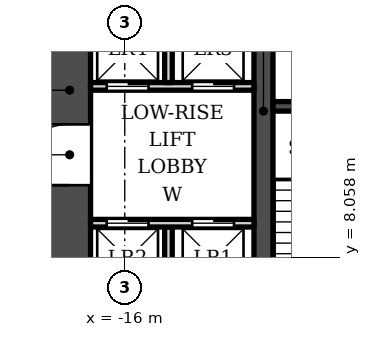
"""IFC4 building model, lengths in metres.
Left out: names, types, materials, properties, quantities, classifications, styles, units other than length and angle.
Written with IfcOpenShell. Run it as: python <this file> out.ifc"""

import sys

from ifc_helpers import new_model, si_unit, direction, frame, frame_2d, origin, place, context, subcontext, project, spatial, rectangle, extrude, element, fill, save


model = new_model("IFC4")
c1 = context("Model", 3, precision=1e-05, world=origin(), true_north=direction((0.0, 1.0)))
c2 = subcontext(c1, "Body", "Model", "MODEL_VIEW")
j1 = project(units=[si_unit("LENGTHUNIT", "METRE"), si_unit("PLANEANGLEUNIT", "RADIAN")], contexts=[c1])
p1 = place(None, origin())
s1 = spatial("IfcSite", under=j1, at=p1, CompositionType="ELEMENT")
p2 = place(p1, origin())
s2 = spatial("IfcBuilding", under=s1, at=p2, CompositionType="ELEMENT")
p3 = place(p2, frame((0.0, 0.0, 20.0)))
s3 = spatial("IfcBuildingStorey", under=s2, at=p3, CompositionType="ELEMENT", Elevation=20.0)
p4 = place(p3, frame((-12.35, 5.253, 0.0), z_axis=(0.0, 0.0, 1.0), x_axis=(0.0, 1.0, 0.0)))
e1 = element("IfcWall", 1, at=p4, inside=s3, PredefinedType="SHEAR", context=c2, shape_type="SweptSolid", body=[
    extrude(rectangle(XDim=13.3, YDim=0.5, at=frame_2d((6.65, 0.0))), origin(), (0.0, 0.0, 1.0), 9.0),
])
p5 = place(p3, frame((-12.1, 12.028, 0.0), z_axis=(0.0, 0.0, 1.0), x_axis=(1.0, 0.0, 0.0)))
e2 = element("IfcWall", 2, at=p5, inside=s3, PredefinedType="SHEAR", context=c2, shape_type="SweptSolid", body=[
    extrude(rectangle(XDim=3.75, YDim=0.25, at=frame_2d((1.875, 0.0))), origin(), (0.0, 0.0, 1.0), 9.0),
])
p6 = place(p3, frame((-17.45, 5.853, 0.0), z_axis=(0.0, 0.0, 1.0), x_axis=(0.0, 1.0, 0.0)))
e3 = element("IfcWall", 3, at=p6, inside=s3, PredefinedType="SHEAR", context=c2, shape_type="SweptSolid", body=[
    extrude(rectangle(XDim=13.2, YDim=1.1, at=frame_2d((6.6, 0.0))), origin(), (0.0, 0.0, 1.0), 9.0),
])
p7 = place(p6, frame((4.1, 0.0, 0.0)))
e4 = element("IfcOpeningElement", 4, at=p7, cuts=e3, PredefinedType="OPENING", context=c2, shape_type="SweptSolid", body=[
    extrude(rectangle(XDim=1.6, YDim=2.1, at=frame_2d((0.8, 1.05))), frame((0.0, 0.56, 0.0), z_axis=(0.0, -1.0, 0.0), x_axis=(1.0, 0.0, 0.0)), (0.0, 0.0, 1.0), 1.12),
])
p8 = place(p6, frame((9.75, 0.0, 0.0)))
e5 = element("IfcOpeningElement", 5, at=p8, cuts=e3, PredefinedType="OPENING", context=c2, shape_type="SweptSolid", body=[
    extrude(rectangle(XDim=0.9, YDim=2.1, at=frame_2d((0.45, 1.05))), frame((0.0, 0.56, 0.0), z_axis=(0.0, -1.0, 0.0), x_axis=(1.0, 0.0, 0.0)), (0.0, 0.0, 1.0), 1.12),
])
p9 = place(p3, frame((-14.85, 6.353, 0.0), z_axis=(0.0, 0.0, 1.0), x_axis=(0.0, 1.0, 0.0)))
e6 = element("IfcWall", 6, at=p9, inside=s3, PredefinedType="SOLIDWALL", context=c2, shape_type="SweptSolid", body=[
    extrude(rectangle(XDim=2.5, YDim=0.2, at=frame_2d((1.25, 0.0))), origin(), (0.0, 0.0, 1.0), 8.55),
])
p10 = place(p3, frame((-16.9, 8.953, 0.0), z_axis=(0.0, 0.0, 1.0), x_axis=(1.0, 0.0, 0.0)))
e7 = element("IfcWall", 7, at=p10, inside=s3, PredefinedType="SOLIDWALL", context=c2, shape_type="SweptSolid", body=[
    extrude(rectangle(XDim=4.3, YDim=0.2, at=frame_2d((2.15, 0.0))), origin(), (0.0, 0.0, 1.0), 8.55),
])
p11 = place(p10, frame((2.675, 0.0, 0.0)))
e8 = element("IfcOpeningElement", 8, at=p11, cuts=e7, PredefinedType="OPENING", context=c2, shape_type="SweptSolid", body=[
    extrude(rectangle(XDim=1.1, YDim=2.1, at=frame_2d((0.55, 1.05))), frame((0.0, 0.11, 0.0), z_axis=(0.0, -1.0, 0.0), x_axis=(1.0, 0.0, 0.0)), (0.0, 0.0, 1.0), 0.22),
])
p12 = place(p10, frame((0.425, 0.0, 0.0)))
e9 = element("IfcOpeningElement", 9, at=p12, cuts=e7, PredefinedType="OPENING", context=c2, shape_type="SweptSolid", body=[
    extrude(rectangle(XDim=1.1, YDim=2.1, at=frame_2d((0.55, 1.05))), frame((0.0, 0.11, 0.0), z_axis=(0.0, -1.0, 0.0), x_axis=(1.0, 0.0, 0.0)), (0.0, 0.0, 1.0), 0.22),
])
p13 = place(p3, frame((-16.9, 12.552, 0.0), z_axis=(0.0, 0.0, 1.0), x_axis=(1.0, 0.0, 0.0)))
e10 = element("IfcWall", 10, at=p13, inside=s3, PredefinedType="SOLIDWALL", context=c2, shape_type="SweptSolid", body=[
    extrude(rectangle(XDim=4.3, YDim=0.2, at=frame_2d((2.15, 0.0))), origin(), (0.0, 0.0, 1.0), 8.55),
])
p14 = place(p13, frame((2.675, 0.0, 0.0)))
e11 = element("IfcOpeningElement", 11, at=p14, cuts=e10, PredefinedType="OPENING", context=c2, shape_type="SweptSolid", body=[
    extrude(rectangle(XDim=1.1, YDim=2.1, at=frame_2d((0.55, 1.05))), frame((0.0, 0.11, 0.0), z_axis=(0.0, -1.0, 0.0), x_axis=(1.0, 0.0, 0.0)), (0.0, 0.0, 1.0), 0.22),
])
p15 = place(p13, frame((0.425, 0.0, 0.0)))
e12 = element("IfcOpeningElement", 12, at=p15, cuts=e10, PredefinedType="OPENING", context=c2, shape_type="SweptSolid", body=[
    extrude(rectangle(XDim=1.1, YDim=2.1, at=frame_2d((0.55, 1.05))), frame((0.0, 0.11, 0.0), z_axis=(0.0, -1.0, 0.0), x_axis=(1.0, 0.0, 0.0)), (0.0, 0.0, 1.0), 0.22),
])
p16 = place(p3, frame((-14.85, 12.653, 0.0), z_axis=(0.0, 0.0, 1.0), x_axis=(0.0, 1.0, 0.0)))
e13 = element("IfcWall", 13, at=p16, inside=s3, PredefinedType="SOLIDWALL", context=c2, shape_type="SweptSolid", body=[
    extrude(rectangle(XDim=2.6, YDim=0.2, at=frame_2d((1.3, 0.0))), origin(), (0.0, 0.0, 1.0), 8.55),
])
p17 = place(p11, origin())
e14 = element("IfcDoor", 14, at=p17, inside=s3, OperationType="DOUBLE_DOOR_SLIDING", PredefinedType="DOOR", context=c2, shape_type="SweptSolid", body=[
    extrude(rectangle(XDim=1.1, YDim=2.1, at=frame_2d((0.55, 1.05))), frame((0.0, 0.025, 0.0), z_axis=(0.0, -1.0, 0.0), x_axis=(1.0, 0.0, 0.0)), (0.0, 0.0, 1.0), 0.05),
])
fill(e8, e14)
p18 = place(p14, origin())
e15 = element("IfcDoor", 15, at=p18, inside=s3, OperationType="DOUBLE_DOOR_SLIDING", PredefinedType="DOOR", context=c2, shape_type="SweptSolid", body=[
    extrude(rectangle(XDim=1.1, YDim=2.1, at=frame_2d((0.55, 1.05))), frame((0.0, 0.025, 0.0), z_axis=(0.0, -1.0, 0.0), x_axis=(1.0, 0.0, 0.0)), (0.0, 0.0, 1.0), 0.05),
])
fill(e11, e15)
p19 = place(p12, origin())
e16 = element("IfcDoor", 16, at=p19, inside=s3, OperationType="DOUBLE_DOOR_SLIDING", PredefinedType="DOOR", context=c2, shape_type="SweptSolid", body=[
    extrude(rectangle(XDim=1.1, YDim=2.1, at=frame_2d((0.55, 1.05))), frame((0.0, 0.025, 0.0), z_axis=(0.0, -1.0, 0.0), x_axis=(1.0, 0.0, 0.0)), (0.0, 0.0, 1.0), 0.05),
])
fill(e9, e16)
p20 = place(p15, origin())
e17 = element("IfcDoor", 17, at=p20, inside=s3, OperationType="DOUBLE_DOOR_SLIDING", PredefinedType="DOOR", context=c2, shape_type="SweptSolid", body=[
    extrude(rectangle(XDim=1.1, YDim=2.1, at=frame_2d((0.55, 1.05))), frame((0.0, 0.025, 0.0), z_axis=(0.0, -1.0, 0.0), x_axis=(1.0, 0.0, 0.0)), (0.0, 0.0, 1.0), 0.05),
])
fill(e12, e17)
p21 = place(p7, origin())
e18 = element("IfcDoor", 18, at=p21, inside=s3, OperationType="DOUBLE_DOOR_SINGLE_SWING", PredefinedType="DOOR", context=c2, shape_type="SweptSolid", body=[
    extrude(rectangle(XDim=1.6, YDim=2.1, at=frame_2d((0.8, 1.05))), frame((0.0, -0.225, 0.0), z_axis=(0.0, -1.0, 0.0), x_axis=(1.0, 0.0, 0.0)), (0.0, 0.0, 1.0), 0.05),
])
fill(e4, e18)
save(model, sys.argv[1])
